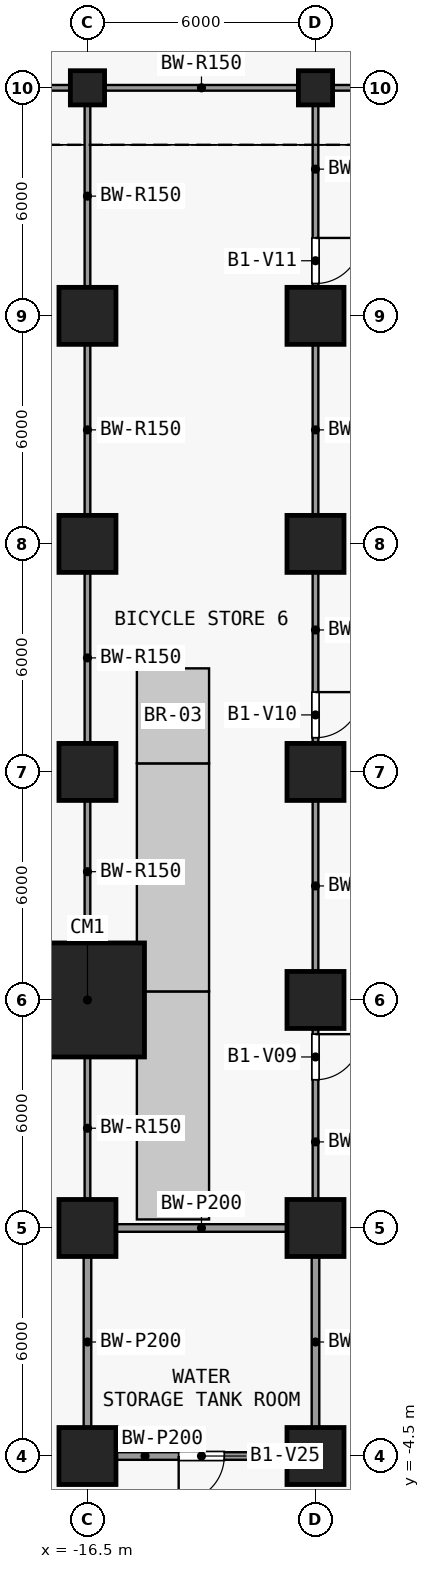
"""IFC4 building model, lengths in metres.
Left out: names, types, materials, properties, quantities, classifications, styles, units other than length and angle.
Written with IfcOpenShell. Run it as: python <this file> out.ifc"""

import sys

from ifc_helpers import new_model, si_unit, direction, frame, frame_2d, origin, origin_2d, place, context, subcontext, project, spatial, rectangle, extrude, element, fill, save


model = new_model("IFC4")
c1 = context("Model", 3, precision=1e-05, world=origin(), true_north=direction((0.0, 1.0)))
c2 = subcontext(c1, "Body", "Model", "MODEL_VIEW")
j1 = project(units=[si_unit("LENGTHUNIT", "METRE"), si_unit("PLANEANGLEUNIT", "RADIAN")], contexts=[c1])
p1 = place(None, origin())
s1 = spatial("IfcSite", under=j1, at=p1, CompositionType="ELEMENT")
p2 = place(p1, origin())
s2 = spatial("IfcBuilding", under=s1, at=p2, CompositionType="ELEMENT")
p3 = place(p2, frame((0.0, 0.0, -5.0)))
s3 = spatial("IfcBuildingStorey", under=s2, at=p3, CompositionType="ELEMENT", Elevation=-5.0)
for number, where, z_axis, x_axis in (
    (1, (-16.5, -4.5, 0.0), (0.0, 0.0, 1.0), (1.0, 0.0, 0.0)),
    (2, (-16.5, 1.5, 0.0), (0.0, 0.0, 1.0), (1.0, 0.0, 0.0)),
):
    element("IfcColumn", number, at=place(p3, frame(where, z_axis=z_axis, x_axis=x_axis)), inside=s3, PredefinedType="COLUMN", context=c2, shape_type="SweptSolid", body=[
        extrude(rectangle(XDim=1.5, YDim=1.5, at=origin_2d()), origin(), (0.0, 0.0, 1.0), 5.0),
    ])
p4 = place(p3, frame((-16.5, 7.5, 0.0), z_axis=(0.0, 0.0, 1.0), x_axis=(1.0, 0.0, 0.0)))
e3 = element("IfcColumn", 3, at=p4, inside=s3, PredefinedType="COLUMN", context=c2, shape_type="SweptSolid", body=[
    extrude(rectangle(XDim=3.0, YDim=3.0, at=origin_2d()), origin(), (0.0, 0.0, 1.0), 5.0),
])
for number, where, z_axis, x_axis in (
    (4, (-16.5, 13.5, 0.0), (0.0, 0.0, 1.0), (1.0, 0.0, 0.0)),
    (5, (-16.5, 19.5, 0.0), (0.0, 0.0, 1.0), (1.0, 0.0, 0.0)),
    (6, (-16.5, 25.5, 0.0), (0.0, 0.0, 1.0), (1.0, 0.0, 0.0)),
):
    element("IfcColumn", number, at=place(p3, frame(where, z_axis=z_axis, x_axis=x_axis)), inside=s3, PredefinedType="COLUMN", context=c2, shape_type="SweptSolid", body=[
        extrude(rectangle(XDim=1.5, YDim=1.5, at=origin_2d()), origin(), (0.0, 0.0, 1.0), 5.0),
    ])
p5 = place(p3, frame((-16.5, 31.5, 0.0), z_axis=(0.0, 0.0, 1.0), x_axis=(1.0, 0.0, 0.0)))
e7 = element("IfcColumn", 7, at=p5, inside=s3, PredefinedType="COLUMN", context=c2, shape_type="SweptSolid", body=[
    extrude(rectangle(XDim=0.9, YDim=0.9, at=origin_2d()), origin(), (0.0, 0.0, 1.0), 5.0),
])
for number, where, z_axis, x_axis in (
    (8, (-10.5, -4.5, 0.0), (0.0, 0.0, 1.0), (1.0, 0.0, 0.0)),
    (9, (-10.5, 1.5, 0.0), (0.0, 0.0, 1.0), (1.0, 0.0, 0.0)),
    (10, (-10.5, 7.5, 0.0), (0.0, 0.0, 1.0), (1.0, 0.0, 0.0)),
    (11, (-10.5, 13.5, 0.0), (0.0, 0.0, 1.0), (1.0, 0.0, 0.0)),
    (12, (-10.5, 19.5, 0.0), (0.0, 0.0, 1.0), (1.0, 0.0, 0.0)),
    (13, (-10.5, 25.5, 0.0), (0.0, 0.0, 1.0), (1.0, 0.0, 0.0)),
):
    element("IfcColumn", number, at=place(p3, frame(where, z_axis=z_axis, x_axis=x_axis)), inside=s3, PredefinedType="COLUMN", context=c2, shape_type="SweptSolid", body=[
        extrude(rectangle(XDim=1.5, YDim=1.5, at=origin_2d()), origin(), (0.0, 0.0, 1.0), 5.0),
    ])
p6 = place(p3, frame((-10.5, 31.5, 0.0), z_axis=(0.0, 0.0, 1.0), x_axis=(1.0, 0.0, 0.0)))
e14 = element("IfcColumn", 14, at=p6, inside=s3, PredefinedType="COLUMN", context=c2, shape_type="SweptSolid", body=[
    extrude(rectangle(XDim=0.9, YDim=0.9, at=origin_2d()), origin(), (0.0, 0.0, 1.0), 5.0),
])
p7 = place(p3, frame((-11.25, -4.5, 0.0), z_axis=(0.0, 0.0, 1.0), x_axis=(-1.0, 0.0, 0.0)))
e15 = element("IfcWall", 15, at=p7, inside=s3, PredefinedType="SOLIDWALL", context=c2, shape_type="SweptSolid", body=[
    extrude(rectangle(XDim=4.5, YDim=0.2, at=frame_2d((2.25, 0.0))), origin(), (0.0, 0.0, 1.0), 4.55),
])
p8 = place(p7, frame((1.65, 0.0, 0.0)))
e16 = element("IfcOpeningElement", 16, at=p8, cuts=e15, PredefinedType="OPENING", context=c2, shape_type="SweptSolid", body=[
    extrude(rectangle(XDim=1.2, YDim=2.1, at=frame_2d((0.6, 1.05))), frame((0.0, 0.11, 0.0), z_axis=(0.0, -1.0, 0.0), x_axis=(1.0, 0.0, 0.0)), (0.0, 0.0, 1.0), 0.22),
])
p9 = place(p3, frame((-15.75, 1.5, 0.0), z_axis=(0.0, 0.0, 1.0), x_axis=(1.0, 0.0, 0.0)))
e17 = element("IfcWall", 17, at=p9, inside=s3, PredefinedType="SOLIDWALL", context=c2, shape_type="SweptSolid", body=[
    extrude(rectangle(XDim=4.5, YDim=0.2, at=frame_2d((2.25, 0.0))), origin(), (0.0, 0.0, 1.0), 4.55),
])
for number, where, z_axis, x_axis in (
    (18, (-22.05, 31.5, 0.0), (0.0, 0.0, 1.0), (1.0, 0.0, 0.0)),
    (19, (-16.05, 31.5, 0.0), (0.0, 0.0, 1.0), (1.0, 0.0, 0.0)),
    (20, (-10.05, 31.5, 0.0), (0.0, 0.0, 1.0), (1.0, 0.0, 0.0)),
):
    element("IfcWall", number, at=place(p3, frame(where, z_axis=z_axis, x_axis=x_axis)), inside=s3, PredefinedType="PARTITIONING", context=c2, shape_type="SweptSolid", body=[
        extrude(rectangle(XDim=5.1, YDim=0.15, at=frame_2d((2.55, 0.0))), origin(), (0.0, 0.0, 1.0), 4.55),
    ])
p10 = place(p3, frame((-16.5, -3.75, 0.0), z_axis=(0.0, 0.0, 1.0), x_axis=(0.0, 1.0, 0.0)))
e21 = element("IfcWall", 21, at=p10, inside=s3, PredefinedType="SOLIDWALL", context=c2, shape_type="SweptSolid", body=[
    extrude(rectangle(XDim=4.5, YDim=0.2, at=frame_2d((2.25, 0.0))), origin(), (0.0, 0.0, 1.0), 4.55),
])
for number, where, z_axis, x_axis in (
    (22, (-16.5, 2.25, 0.0), (0.0, 0.0, 1.0), (0.0, 1.0, 0.0)),
    (23, (-16.5, 9.0, 0.0), (0.0, 0.0, 1.0), (0.0, 1.0, 0.0)),
):
    element("IfcWall", number, at=place(p3, frame(where, z_axis=z_axis, x_axis=x_axis)), inside=s3, PredefinedType="PARTITIONING", context=c2, shape_type="SweptSolid", body=[
        extrude(rectangle(XDim=3.75, YDim=0.15, at=frame_2d((1.875, 0.0))), origin(), (0.0, 0.0, 1.0), 4.55),
    ])
for number, where, z_axis, x_axis in (
    (24, (-16.5, 14.25, 0.0), (0.0, 0.0, 1.0), (0.0, 1.0, 0.0)),
    (25, (-16.5, 20.25, 0.0), (0.0, 0.0, 1.0), (0.0, 1.0, 0.0)),
):
    element("IfcWall", number, at=place(p3, frame(where, z_axis=z_axis, x_axis=x_axis)), inside=s3, PredefinedType="PARTITIONING", context=c2, shape_type="SweptSolid", body=[
        extrude(rectangle(XDim=4.5, YDim=0.15, at=frame_2d((2.25, 0.0))), origin(), (0.0, 0.0, 1.0), 4.55),
    ])
p11 = place(p3, frame((-16.5, 26.25, 0.0), z_axis=(0.0, 0.0, 1.0), x_axis=(0.0, 1.0, 0.0)))
e26 = element("IfcWall", 26, at=p11, inside=s3, PredefinedType="PARTITIONING", context=c2, shape_type="SweptSolid", body=[
    extrude(rectangle(XDim=4.8, YDim=0.15, at=frame_2d((2.4, 0.0))), origin(), (0.0, 0.0, 1.0), 4.55),
])
p12 = place(p3, frame((-10.5, -3.75, 0.0), z_axis=(0.0, 0.0, 1.0), x_axis=(0.0, 1.0, 0.0)))
e27 = element("IfcWall", 27, at=p12, inside=s3, PredefinedType="SOLIDWALL", context=c2, shape_type="SweptSolid", body=[
    extrude(rectangle(XDim=4.5, YDim=0.2, at=frame_2d((2.25, 0.0))), origin(), (0.0, 0.0, 1.0), 4.55),
])
p13 = place(p3, frame((-10.5, 6.75, 0.0), z_axis=(0.0, 0.0, 1.0), x_axis=(0.0, -1.0, 0.0)))
e28 = element("IfcWall", 28, at=p13, inside=s3, PredefinedType="PARTITIONING", context=c2, shape_type="SweptSolid", body=[
    extrude(rectangle(XDim=4.5, YDim=0.15, at=frame_2d((2.25, 0.0))), origin(), (0.0, 0.0, 1.0), 4.55),
])
p14 = place(p13, frame((0.15, 0.0, 0.0)))
e29 = element("IfcOpeningElement", 29, at=p14, cuts=e28, PredefinedType="OPENING", context=c2, shape_type="SweptSolid", body=[
    extrude(rectangle(XDim=1.2, YDim=2.1, at=frame_2d((0.6, 1.05))), frame((0.0, 0.085, 0.0), z_axis=(0.0, -1.0, 0.0), x_axis=(1.0, 0.0, 0.0)), (0.0, 0.0, 1.0), 0.17),
])
p15 = place(p3, frame((-10.5, 8.25, 0.0), z_axis=(0.0, 0.0, 1.0), x_axis=(0.0, 1.0, 0.0)))
e30 = element("IfcWall", 30, at=p15, inside=s3, PredefinedType="PARTITIONING", context=c2, shape_type="SweptSolid", body=[
    extrude(rectangle(XDim=4.5, YDim=0.15, at=frame_2d((2.25, 0.0))), origin(), (0.0, 0.0, 1.0), 4.55),
])
p16 = place(p3, frame((-10.5, 18.75, 0.0), z_axis=(0.0, 0.0, 1.0), x_axis=(0.0, -1.0, 0.0)))
e31 = element("IfcWall", 31, at=p16, inside=s3, PredefinedType="PARTITIONING", context=c2, shape_type="SweptSolid", body=[
    extrude(rectangle(XDim=4.5, YDim=0.15, at=frame_2d((2.25, 0.0))), origin(), (0.0, 0.0, 1.0), 4.55),
])
p17 = place(p16, frame((3.15, 0.0, 0.0)))
e32 = element("IfcOpeningElement", 32, at=p17, cuts=e31, PredefinedType="OPENING", context=c2, shape_type="SweptSolid", body=[
    extrude(rectangle(XDim=1.2, YDim=2.1, at=frame_2d((0.6, 1.05))), frame((0.0, 0.085, 0.0), z_axis=(0.0, -1.0, 0.0), x_axis=(1.0, 0.0, 0.0)), (0.0, 0.0, 1.0), 0.17),
])
p18 = place(p3, frame((-10.5, 20.25, 0.0), z_axis=(0.0, 0.0, 1.0), x_axis=(0.0, 1.0, 0.0)))
e33 = element("IfcWall", 33, at=p18, inside=s3, PredefinedType="PARTITIONING", context=c2, shape_type="SweptSolid", body=[
    extrude(rectangle(XDim=4.5, YDim=0.15, at=frame_2d((2.25, 0.0))), origin(), (0.0, 0.0, 1.0), 4.55),
])
p19 = place(p3, frame((-10.5, 31.05, 0.0), z_axis=(0.0, 0.0, 1.0), x_axis=(0.0, -1.0, 0.0)))
e34 = element("IfcWall", 34, at=p19, inside=s3, PredefinedType="PARTITIONING", context=c2, shape_type="SweptSolid", body=[
    extrude(rectangle(XDim=4.8, YDim=0.15, at=frame_2d((2.4, 0.0))), origin(), (0.0, 0.0, 1.0), 4.55),
])
p20 = place(p19, frame((3.5, 0.0, 0.0)))
e35 = element("IfcOpeningElement", 35, at=p20, cuts=e34, PredefinedType="OPENING", context=c2, shape_type="SweptSolid", body=[
    extrude(rectangle(XDim=1.2, YDim=2.1, at=frame_2d((0.6, 1.05))), frame((0.0, 0.085, 0.0), z_axis=(0.0, -1.0, 0.0), x_axis=(1.0, 0.0, 0.0)), (0.0, 0.0, 1.0), 0.17),
])
p21 = place(p14, origin())
e36 = element("IfcDoor", 36, at=p21, inside=s3, OperationType="SINGLE_SWING_LEFT", PredefinedType="DOOR", context=c2, shape_type="SweptSolid", body=[
    extrude(rectangle(XDim=1.2, YDim=2.1, at=frame_2d((0.6, 1.05))), frame((0.0, 0.025, 0.0), z_axis=(0.0, -1.0, 0.0), x_axis=(1.0, 0.0, 0.0)), (0.0, 0.0, 1.0), 0.05),
])
fill(e29, e36)
p22 = place(p17, origin())
e37 = element("IfcDoor", 37, at=p22, inside=s3, OperationType="SINGLE_SWING_LEFT", PredefinedType="DOOR", context=c2, shape_type="SweptSolid", body=[
    extrude(rectangle(XDim=1.2, YDim=2.1, at=frame_2d((0.6, 1.05))), frame((0.0, 0.025, 0.0), z_axis=(0.0, -1.0, 0.0), x_axis=(1.0, 0.0, 0.0)), (0.0, 0.0, 1.0), 0.05),
])
fill(e32, e37)
p23 = place(p20, origin())
e38 = element("IfcDoor", 38, at=p23, inside=s3, OperationType="SINGLE_SWING_LEFT", PredefinedType="DOOR", context=c2, shape_type="SweptSolid", body=[
    extrude(rectangle(XDim=1.2, YDim=2.1, at=frame_2d((0.6, 1.05))), frame((0.0, 0.025, 0.0), z_axis=(0.0, -1.0, 0.0), x_axis=(1.0, 0.0, 0.0)), (0.0, 0.0, 1.0), 0.05),
])
fill(e35, e38)
p24 = place(p8, origin())
e39 = element("IfcDoor", 39, at=p24, inside=s3, OperationType="SINGLE_SWING_RIGHT", PredefinedType="DOOR", context=c2, shape_type="SweptSolid", body=[
    extrude(rectangle(XDim=1.2, YDim=2.1, at=frame_2d((0.6, 1.05))), frame((0.0, 0.025, 0.0), z_axis=(0.0, -1.0, 0.0), x_axis=(1.0, 0.0, 0.0)), (0.0, 0.0, 1.0), 0.05),
])
fill(e16, e39)
save(model, sys.argv[1])
